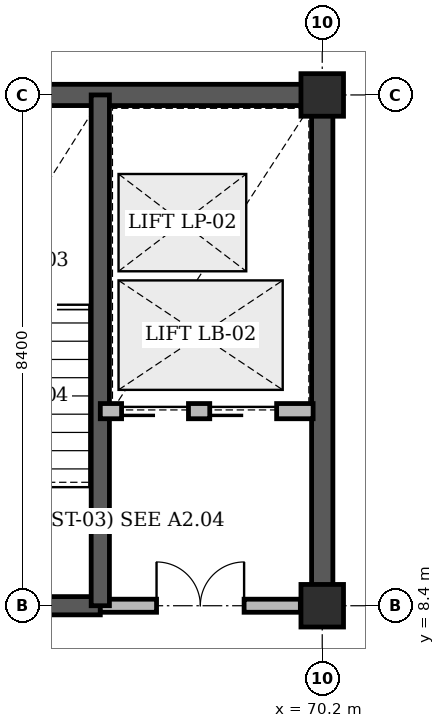
"""IFC4 building model, lengths in metres.
Left out: names, types, materials, properties, quantities, classifications, styles, units other than length and angle.
Written with IfcOpenShell. Run it as: python <this file> out.ifc"""

import sys

from ifc_helpers import new_model, si_unit, direction, frame, frame_2d, origin, origin_2d, place, context, subcontext, project, spatial, rectangle, extrude, element, fill, save


model = new_model("IFC4")
c1 = context("Model", 3, precision=1e-05, world=origin(), true_north=direction((0.0, 1.0)))
c2 = subcontext(c1, "Body", "Model", "MODEL_VIEW")
j1 = project(units=[si_unit("LENGTHUNIT", "METRE"), si_unit("PLANEANGLEUNIT", "RADIAN")], contexts=[c1])
p1 = place(None, origin())
s1 = spatial("IfcSite", under=j1, at=p1, CompositionType="ELEMENT")
p2 = place(p1, origin())
s2 = spatial("IfcBuilding", under=s1, at=p2, CompositionType="ELEMENT")
p3 = place(p2, frame((0.0, 0.0, 14.4)))
s3 = spatial("IfcBuildingStorey", under=s2, at=p3, CompositionType="ELEMENT", Elevation=14.4)
p4 = place(p3, frame((62.225, 16.8, 0.0), z_axis=(0.0, 0.0, 1.0), x_axis=(1.0, 0.0, 0.0)))
e1 = element("IfcWall", 1, at=p4, inside=s3, PredefinedType="SHEAR", context=c2, shape_type="SweptSolid", body=[
    extrude(rectangle(XDim=8.15, YDim=0.35, at=frame_2d((4.075, 0.0))), origin(), (0.0, 0.0, 1.0), 3.28),
])
p5 = place(p3, frame((70.2, 8.4, 0.0), z_axis=(0.0, 0.0, 1.0), x_axis=(0.0, 1.0, 0.0)))
e2 = element("IfcWall", 2, at=p5, inside=s3, PredefinedType="SHEAR", context=c2, shape_type="SweptSolid", body=[
    extrude(rectangle(XDim=8.4, YDim=0.35, at=frame_2d((4.2, 0.0))), origin(), (0.0, 0.0, 1.0), 3.28),
])
for number, where, z_axis, x_axis in (
    (3, (70.2, 8.4, 0.0), (0.0, 0.0, 1.0), (1.0, 0.0, 0.0)),
    (4, (70.2, 16.8, 0.0), (0.0, 0.0, 1.0), (1.0, 0.0, 0.0)),
):
    element("IfcColumn", number, at=place(p3, frame(where, z_axis=z_axis, x_axis=x_axis)), inside=s3, PredefinedType="COLUMN", context=c2, shape_type="SweptSolid", body=[
        extrude(rectangle(XDim=0.7, YDim=0.7, at=origin_2d()), origin(), (0.0, 0.0, 1.0), 3.6),
    ])
p6 = place(p3, frame((62.4, 8.4, 0.0), z_axis=(0.0, 0.0, 1.0), x_axis=(1.0, 0.0, 0.0)))
e5 = element("IfcWall", 5, at=p6, inside=s3, PredefinedType="SHEAR", context=c2, shape_type="SweptSolid", body=[
    extrude(rectangle(XDim=4.15, YDim=0.3, at=frame_2d((2.075, 0.0))), origin(), (0.0, 0.0, 1.0), 3.6),
])
p7 = place(p6, frame((1.515, 0.0, 0.0)))
e6 = element("IfcOpeningElement", 6, at=p7, cuts=e5, PredefinedType="OPENING", context=c2, shape_type="SweptSolid", body=[
    extrude(rectangle(XDim=1.12, YDim=2.15, at=frame_2d((0.56, 1.075))), frame((0.0, 0.16, 0.0), z_axis=(0.0, -1.0, 0.0), x_axis=(1.0, 0.0, 0.0)), (0.0, 0.0, 1.0), 0.32),
])
p8 = place(p3, frame((66.55, 8.4, 0.0), z_axis=(0.0, 0.0, 1.0), x_axis=(1.0, 0.0, 0.0)))
e7 = element("IfcWall", 7, at=p8, inside=s3, PredefinedType="STANDARD", context=c2, shape_type="SweptSolid", body=[
    extrude(rectangle(XDim=3.29, YDim=0.215, at=frame_2d((1.645, 0.0))), origin(), (0.0, 0.0, 1.0), 2.62),
])
p9 = place(p8, frame((0.925, 0.0, 0.0)))
e8 = element("IfcOpeningElement", 8, at=p9, cuts=e7, PredefinedType="OPENING", context=c2, shape_type="SweptSolid", body=[
    extrude(rectangle(XDim=1.44, YDim=2.2, at=frame_2d((0.72, 1.1))), frame((0.0, 0.118, 0.0), z_axis=(0.0, -1.0, 0.0), x_axis=(1.0, 0.0, 0.0)), (0.0, 0.0, 1.0), 0.235),
])
p10 = place(p3, frame((66.55, 8.4, 0.0), z_axis=(0.0, 0.0, 1.0), x_axis=(0.0, 1.0, 0.0)))
e9 = element("IfcWall", 9, at=p10, inside=s3, PredefinedType="SHEAR", context=c2, shape_type="SweptSolid", body=[
    extrude(rectangle(XDim=8.4, YDim=0.3, at=frame_2d((4.2, 0.0))), origin(), (0.0, 0.0, 1.0), 3.6),
])
p11 = place(p3, frame((66.55, 11.6, 0.0), z_axis=(0.0, 0.0, 1.0), x_axis=(1.0, 0.0, 0.0)))
e10 = element("IfcWall", 10, at=p11, inside=s3, PredefinedType="STANDARD", context=c2, shape_type="SweptSolid", body=[
    extrude(rectangle(XDim=3.5, YDim=0.25, at=frame_2d((1.75, 0.0))), origin(), (0.0, 0.0, 1.0), 3.3),
])
p12 = place(p11, frame((0.35, 0.0, 0.0)))
e11 = element("IfcOpeningElement", 11, at=p12, cuts=e10, PredefinedType="OPENING", context=c2, shape_type="SweptSolid", body=[
    extrude(rectangle(XDim=1.1, YDim=2.2, at=frame_2d((0.55, 1.1))), frame((0.0, 0.135, 0.0), z_axis=(0.0, -1.0, 0.0), x_axis=(1.0, 0.0, 0.0)), (0.0, 0.0, 1.0), 0.27),
])
p13 = place(p11, frame((1.8, 0.0, 0.0)))
e12 = element("IfcOpeningElement", 12, at=p13, cuts=e10, PredefinedType="OPENING", context=c2, shape_type="SweptSolid", body=[
    extrude(rectangle(XDim=1.1, YDim=2.2, at=frame_2d((0.55, 1.1))), frame((0.0, 0.135, 0.0), z_axis=(0.0, -1.0, 0.0), x_axis=(1.0, 0.0, 0.0)), (0.0, 0.0, 1.0), 0.27),
])
p14 = place(p9, origin())
e13 = element("IfcDoor", 13, at=p14, inside=s3, OperationType="DOUBLE_DOOR_SINGLE_SWING", PredefinedType="DOOR", context=c2, shape_type="SweptSolid", body=[
    extrude(rectangle(XDim=1.44, YDim=2.2, at=frame_2d((0.72, 1.1))), frame((0.0, 0.025, 0.0), z_axis=(0.0, -1.0, 0.0), x_axis=(1.0, 0.0, 0.0)), (0.0, 0.0, 1.0), 0.05),
])
fill(e8, e13)
p15 = place(p12, origin())
e14 = element("IfcDoor", 14, at=p15, inside=s3, OperationType="SLIDING_TO_LEFT", PredefinedType="DOOR", context=c2, shape_type="SweptSolid", body=[
    extrude(rectangle(XDim=1.1, YDim=2.2, at=frame_2d((0.55, 1.1))), frame((0.0, 0.025, 0.0), z_axis=(0.0, -1.0, 0.0), x_axis=(1.0, 0.0, 0.0)), (0.0, 0.0, 1.0), 0.05),
])
fill(e11, e14)
p16 = place(p13, origin())
e15 = element("IfcDoor", 15, at=p16, inside=s3, OperationType="SLIDING_TO_LEFT", PredefinedType="DOOR", context=c2, shape_type="SweptSolid", body=[
    extrude(rectangle(XDim=1.1, YDim=2.2, at=frame_2d((0.55, 1.1))), frame((0.0, 0.025, 0.0), z_axis=(0.0, -1.0, 0.0), x_axis=(1.0, 0.0, 0.0)), (0.0, 0.0, 1.0), 0.05),
])
fill(e12, e15)
save(model, sys.argv[1])
